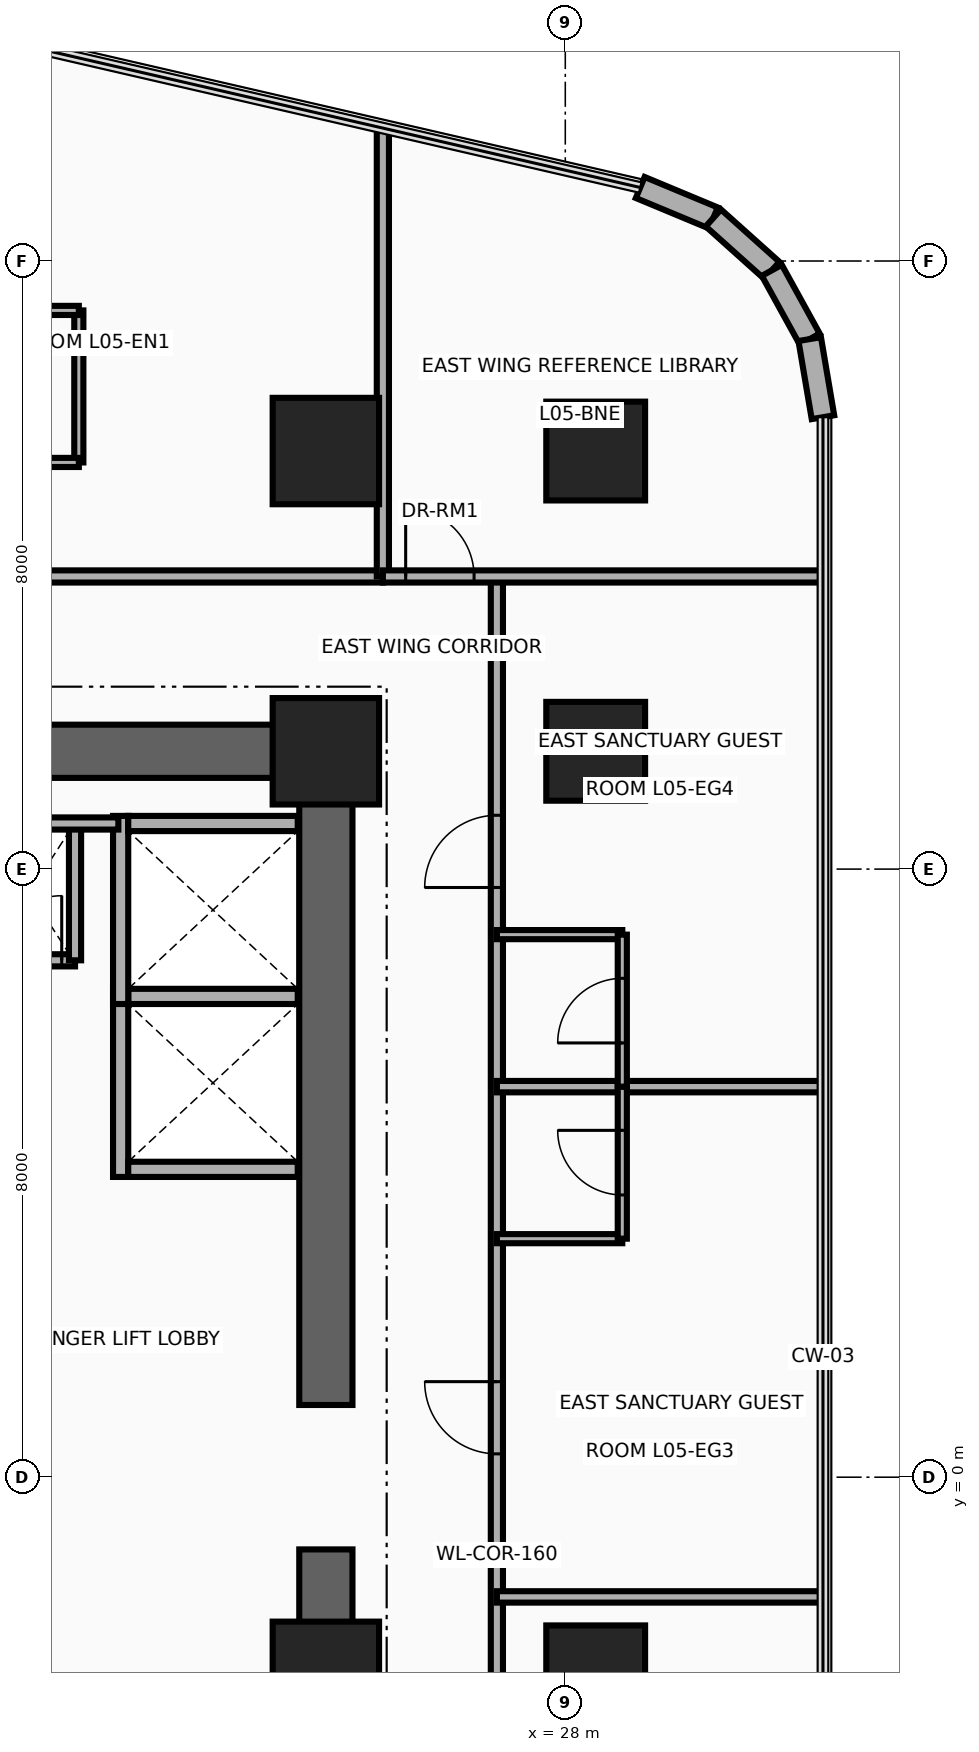
"""IFC4 building model, lengths in metres.
Left out: names, types, materials, properties, quantities, classifications, styles, units other than length and angle.
Written with IfcOpenShell. Run it as: python <this file> out.ifc"""

import sys

from ifc_helpers import new_model, si_unit, direction, frame, frame_2d, origin, origin_2d, place, context, subcontext, project, spatial, rectangle, circle, extrude, source, transform, mapped, element, fill, save


model = new_model("IFC4")
c1 = context("Model", 3, precision=1e-05, world=origin(), true_north=direction((0.0, 1.0)))
c2 = subcontext(c1, "Body", "Model", "MODEL_VIEW")
j1 = project(units=[si_unit("LENGTHUNIT", "METRE"), si_unit("PLANEANGLEUNIT", "RADIAN")], contexts=[c1])
p1 = place(None, origin())
s1 = spatial("IfcSite", under=j1, at=p1, CompositionType="ELEMENT")
p2 = place(p1, origin())
s2 = spatial("IfcBuilding", under=s1, at=p2, CompositionType="ELEMENT")
p3 = place(p2, frame((0.0, 0.0, 26.0)))
s3 = spatial("IfcBuildingStorey", under=s2, at=p3, CompositionType="ELEMENT", Elevation=26.0)
for number, where, z_axis, x_axis in (
    (1, (24.85, -9.9, 0.0), (0.0, 0.0, 1.0), (0.0, 1.0, 0.0)),
    (2, (24.85, 0.95, 0.0), (0.0, 0.0, 1.0), (0.0, 1.0, 0.0)),
):
    element("IfcWall", number, at=place(p3, frame(where, z_axis=z_axis, x_axis=x_axis)), inside=s3, PredefinedType="SHEAR", context=c2, shape_type="SweptSolid", body=[
        extrude(rectangle(XDim=8.95, YDim=0.7, at=frame_2d((4.475, 0.0))), origin(), (0.0, 0.0, 1.0), 3.46),
    ])
p4 = place(p3, frame((15.85, 9.55, 0.0), z_axis=(0.0, 0.0, 1.0), x_axis=(1.0, 0.0, 0.0)))
e3 = element("IfcWall", 3, at=p4, inside=s3, PredefinedType="SHEAR", context=c2, shape_type="SweptSolid", body=[
    extrude(rectangle(XDim=9.0, YDim=0.7, at=frame_2d((4.5, 0.0))), origin(), (0.0, 0.0, 1.0), 3.46),
])
m1 = source(origin(), c2, "Body", "SweptSolid", [
    extrude(rectangle(XDim=1.4, YDim=1.4, at=origin_2d()), origin(), (0.0, 0.0, 1.0), 3.7),
])
p5 = place(p3, frame((24.85, -2.6, 0.0), z_axis=(0.0, 0.0, 1.0), x_axis=(1.0, 0.0, 0.0)))
e4 = element("IfcColumn", 4, at=p5, inside=s3, PredefinedType="COLUMN", context=c2, shape_type="MappedRepresentation", body=[
    mapped(m1, transform((0.0, 0.0, 0.0), x_axis=(1.0, 0.0, 0.0), y_axis=(0.0, 1.0, 0.0), z_axis=(0.0, 0.0, 1.0), scale=1.0)),
])
m2 = source(origin(), c2, "Body", "SweptSolid", [
    extrude(circle(Radius=0.65, at=origin_2d()), origin(), (0.0, 0.0, 1.0), 3.7),
])
p6 = place(p3, frame((28.4, -2.6, 0.0), z_axis=(0.0, 0.0, 1.0), x_axis=(1.0, 0.0, 0.0)))
e5 = element("IfcColumn", 5, at=p6, inside=s3, PredefinedType="COLUMN", context=c2, shape_type="MappedRepresentation", body=[
    mapped(m2, transform((0.0, 0.0, 0.0), x_axis=(1.0, 0.0, 0.0), y_axis=(0.0, 1.0, 0.0), z_axis=(0.0, 0.0, 1.0), scale=1.0)),
])
p7 = place(p3, frame((24.85, 9.55, 0.0), z_axis=(0.0, 0.0, 1.0), x_axis=(1.0, 0.0, 0.0)))
e6 = element("IfcColumn", 6, at=p7, inside=s3, PredefinedType="COLUMN", context=c2, shape_type="MappedRepresentation", body=[
    mapped(m1, transform((0.0, 0.0, 0.0), x_axis=(1.0, 0.0, 0.0), y_axis=(0.0, 1.0, 0.0), z_axis=(0.0, 0.0, 1.0), scale=1.0)),
])
p8 = place(p3, frame((28.4, 9.55, 0.0), z_axis=(0.0, 0.0, 1.0), x_axis=(1.0, 0.0, 0.0)))
e7 = element("IfcColumn", 7, at=p8, inside=s3, PredefinedType="COLUMN", context=c2, shape_type="MappedRepresentation", body=[
    mapped(m2, transform((0.0, 0.0, 0.0), x_axis=(1.0, 0.0, 0.0), y_axis=(0.0, 1.0, 0.0), z_axis=(0.0, 0.0, 1.0), scale=1.0)),
])
p9 = place(p3, frame((24.85, 13.5, 0.0), z_axis=(0.0, 0.0, 1.0), x_axis=(1.0, 0.0, 0.0)))
e8 = element("IfcColumn", 8, at=p9, inside=s3, PredefinedType="COLUMN", context=c2, shape_type="MappedRepresentation", body=[
    mapped(m1, transform((0.0, 0.0, 0.0), x_axis=(1.0, 0.0, 0.0), y_axis=(0.0, 1.0, 0.0), z_axis=(0.0, 0.0, 1.0), scale=1.0)),
])
p10 = place(p3, frame((28.4, 13.5, 0.0), z_axis=(0.0, 0.0, 1.0), x_axis=(1.0, 0.0, 0.0)))
e9 = element("IfcColumn", 9, at=p10, inside=s3, PredefinedType="COLUMN", context=c2, shape_type="MappedRepresentation", body=[
    mapped(m2, transform((0.0, 0.0, 0.0), x_axis=(1.0, 0.0, 0.0), y_axis=(0.0, 1.0, 0.0), z_axis=(0.0, 0.0, 1.0), scale=1.0)),
])
p11 = place(p3, frame((28.986, 16.967, 0.0), z_axis=(0.0, 0.0, 1.0), x_axis=(0.923083852684, -0.384598753136, 0.0)))
e10 = element("IfcWall", 10, at=p11, inside=s3, PredefinedType="SOLIDWALL", context=c2, shape_type="SweptSolid", body=[
    extrude(rectangle(XDim=1.042, YDim=0.3, at=frame_2d((0.521, 0.0))), origin(), (0.0, 0.0, 1.0), 3.46),
])
p12 = place(p3, frame((29.948, 16.566, 0.0), z_axis=(0.0, 0.0, 1.0), x_axis=(0.744585645533, -0.66752694063, 0.0)))
e11 = element("IfcWall", 11, at=p12, inside=s3, PredefinedType="SOLIDWALL", context=c2, shape_type="SweptSolid", body=[
    extrude(rectangle(XDim=1.033, YDim=0.3, at=frame_2d((0.517, 0.0))), origin(), (0.0, 0.0, 1.0), 3.46),
])
p13 = place(p3, frame((30.717, 15.877, 0.0), z_axis=(0.0, 0.0, 1.0), x_axis=(0.482971098131, -0.875636293429, 0.0)))
e12 = element("IfcWall", 12, at=p13, inside=s3, PredefinedType="SOLIDWALL", context=c2, shape_type="SweptSolid", body=[
    extrude(rectangle(XDim=1.033, YDim=0.3, at=frame_2d((0.516, 0.0))), origin(), (0.0, 0.0, 1.0), 3.46),
])
p14 = place(p3, frame((31.216, 14.973, 0.0), z_axis=(0.0, 0.0, 1.0), x_axis=(0.167019462117, -0.985953598946, 0.0)))
e13 = element("IfcWall", 13, at=p14, inside=s3, PredefinedType="SOLIDWALL", context=c2, shape_type="SweptSolid", body=[
    extrude(rectangle(XDim=1.042, YDim=0.3, at=frame_2d((0.521, 0.0))), origin(), (0.0, 0.0, 1.0), 3.46),
])
p15 = place(p3, frame((22.15, 3.95, 0.0), z_axis=(0.0, 0.0, 1.0), x_axis=(0.0, 1.0, 0.0)))
e14 = element("IfcWall", 14, at=p15, inside=s3, PredefinedType="MOVABLE", context=c2, shape_type="SweptSolid", body=[
    extrude(rectangle(XDim=2.475, YDim=0.2, at=frame_2d((1.238, 0.0))), origin(), (0.0, 0.0, 1.0), 3.46),
])
for number, where, z_axis, x_axis in (
    (15, (22.25, 4.05, 0.0), (0.0, 0.0, 1.0), (1.0, 0.0, 0.0)),
    (16, (22.25, 6.325, 0.0), (0.0, 0.0, 1.0), (1.0, 0.0, 0.0)),
):
    element("IfcWall", number, at=place(p3, frame(where, z_axis=z_axis, x_axis=x_axis)), inside=s3, PredefinedType="MOVABLE", context=c2, shape_type="SweptSolid", body=[
        extrude(rectangle(XDim=2.23, YDim=0.2, at=frame_2d((1.115, 0.0))), origin(), (0.0, 0.0, 1.0), 2.245),
    ])
p16 = place(p3, frame((22.15, 6.225, 0.0), z_axis=(0.0, 0.0, 1.0), x_axis=(0.0, 1.0, 0.0)))
e17 = element("IfcWall", 17, at=p16, inside=s3, PredefinedType="MOVABLE", context=c2, shape_type="SweptSolid", body=[
    extrude(rectangle(XDim=2.475, YDim=0.2, at=frame_2d((1.237, 0.0))), origin(), (0.0, 0.0, 1.0), 3.46),
])
p17 = place(p3, frame((22.25, 8.6, 0.0), z_axis=(0.0, 0.0, 1.0), x_axis=(1.0, 0.0, 0.0)))
e18 = element("IfcWall", 18, at=p17, inside=s3, PredefinedType="MOVABLE", context=c2, shape_type="SweptSolid", body=[
    extrude(rectangle(XDim=2.23, YDim=0.2, at=frame_2d((1.115, 0.0))), origin(), (0.0, 0.0, 1.0), 2.245),
])
p18 = place(p3, frame((20.35, 6.8, 0.0), z_axis=(0.0, 0.0, 1.0), x_axis=(1.0, 0.0, 0.0)))
e19 = element("IfcWall", 19, at=p18, inside=s3, PredefinedType="PARTITIONING", context=c2, shape_type="SweptSolid", body=[
    extrude(rectangle(XDim=1.2, YDim=0.16, at=frame_2d((0.6, 0.0))), origin(), (0.0, 0.0, 1.0), 3.46),
])
p19 = place(p18, frame((0.175, 0.0, 0.0)))
e20 = element("IfcOpeningElement", 20, at=p19, cuts=e19, PredefinedType="OPENING", context=c2, shape_type="SweptSolid", body=[
    extrude(rectangle(XDim=0.85, YDim=2.05, at=frame_2d((0.425, 1.025))), frame((0.0, 0.095, 0.0), z_axis=(0.0, -1.0, 0.0), x_axis=(1.0, 0.0, 0.0)), (0.0, 0.0, 1.0), 0.19),
])
p20 = place(p3, frame((21.55, 6.8, 0.0), z_axis=(0.0, 0.0, 1.0), x_axis=(0.0, 1.0, 0.0)))
e21 = element("IfcWall", 21, at=p20, inside=s3, PredefinedType="PARTITIONING", context=c2, shape_type="SweptSolid", body=[
    extrude(rectangle(XDim=1.8, YDim=0.16, at=frame_2d((0.9, 0.0))), origin(), (0.0, 0.0, 1.0), 3.46),
])
p21 = place(p3, frame((20.3, 8.6, 0.0), z_axis=(0.0, 0.0, 1.0), x_axis=(1.0, 0.0, 0.0)))
e22 = element("IfcWall", 22, at=p21, inside=s3, PredefinedType="PARTITIONING", context=c2, shape_type="SweptSolid", body=[
    extrude(rectangle(XDim=1.82, YDim=0.16, at=frame_2d((0.91, 0.0))), origin(), (0.0, 0.0, 1.0), 3.46),
])
p22 = place(p3, frame((15.4, 11.85, 0.0), z_axis=(0.0, 0.0, 1.0), x_axis=(1.0, 0.0, 0.0)))
e23 = element("IfcWall", 23, at=p22, inside=s3, PredefinedType="PARTITIONING", context=c2, shape_type="SweptSolid", body=[
    extrude(rectangle(XDim=10.2, YDim=0.16, at=frame_2d((5.1, 0.0))), origin(), (0.0, 0.0, 1.0), 2.834),
])
p23 = place(p22, frame((4.625, 0.0, 0.0)))
e24 = element("IfcOpeningElement", 24, at=p23, cuts=e23, PredefinedType="OPENING", context=c2, shape_type="SweptSolid", body=[
    extrude(rectangle(XDim=0.95, YDim=2.15, at=frame_2d((0.475, 1.075))), frame((0.0, 0.095, 0.0), z_axis=(0.0, -1.0, 0.0), x_axis=(1.0, 0.0, 0.0)), (0.0, 0.0, 1.0), 0.19),
])
p24 = place(p3, frame((25.6, 11.85, 0.0), z_axis=(0.0, 0.0, 1.0), x_axis=(0.0, 1.0, 0.0)))
e25 = element("IfcWall", 25, at=p24, inside=s3, PredefinedType="PARTITIONING", context=c2, shape_type="SweptSolid", body=[
    extrude(rectangle(XDim=5.898, YDim=0.16, at=frame_2d((2.949, 0.0))), origin(), (0.0, 0.0, 1.0), 2.583),
])
p25 = place(p3, frame((21.6, 13.35, 0.0), z_axis=(0.0, 0.0, 1.0), x_axis=(0.0, 1.0, 0.0)))
e26 = element("IfcWall", 26, at=p25, inside=s3, PredefinedType="PARTITIONING", context=c2, shape_type="SweptSolid", body=[
    extrude(rectangle(XDim=2.0, YDim=0.12, at=frame_2d((1.0, 0.0))), origin(), (0.0, 0.0, 1.0), 2.583),
])
p26 = place(p3, frame((19.4, 15.35, 0.0), z_axis=(0.0, 0.0, 1.0), x_axis=(1.0, 0.0, 0.0)))
e27 = element("IfcWall", 27, at=p26, inside=s3, PredefinedType="PARTITIONING", context=c2, shape_type="SweptSolid", body=[
    extrude(rectangle(XDim=2.2, YDim=0.12, at=frame_2d((1.1, 0.0))), origin(), (0.0, 0.0, 1.0), 3.46),
])
p27 = place(p3, frame((19.4, 13.35, 0.0), z_axis=(0.0, 0.0, 1.0), x_axis=(1.0, 0.0, 0.0)))
e28 = element("IfcWall", 28, at=p27, inside=s3, PredefinedType="PARTITIONING", context=c2, shape_type="SweptSolid", body=[
    extrude(rectangle(XDim=2.2, YDim=0.12, at=frame_2d((1.1, 0.0))), origin(), (0.0, 0.0, 1.0), 2.583),
])
p28 = place(p27, frame((0.675, 0.0, 0.0)))
e29 = element("IfcOpeningElement", 29, at=p28, cuts=e28, PredefinedType="OPENING", context=c2, shape_type="SweptSolid", body=[
    extrude(rectangle(XDim=0.85, YDim=2.1, at=frame_2d((0.425, 1.05))), frame((0.0, 0.075, 0.0), z_axis=(0.0, -1.0, 0.0), x_axis=(1.0, 0.0, 0.0)), (0.0, 0.0, 1.0), 0.15),
])
p29 = place(p3, frame((27.1, -13.89, 0.0), z_axis=(0.0, 0.0, 1.0), x_axis=(0.0, 1.0, 0.0)))
e30 = element("IfcWall", 30, at=p29, inside=s3, PredefinedType="PARTITIONING", context=c2, shape_type="SweptSolid", body=[
    extrude(rectangle(XDim=25.74, YDim=0.16, at=frame_2d((12.87, 0.0))), origin(), (0.0, 0.0, 1.0), 2.583),
])
p30 = place(p29, frame((2.62, 0.0, 0.0)))
e31 = element("IfcOpeningElement", 31, at=p30, cuts=e30, PredefinedType="OPENING", context=c2, shape_type="SweptSolid", body=[
    extrude(rectangle(XDim=0.95, YDim=2.15, at=frame_2d((0.475, 1.075))), frame((0.0, 0.095, 0.0), z_axis=(0.0, -1.0, 0.0), x_axis=(1.0, 0.0, 0.0)), (0.0, 0.0, 1.0), 0.19),
])
p31 = place(p29, frame((8.484, 0.0, 0.0)))
e32 = element("IfcOpeningElement", 32, at=p31, cuts=e30, PredefinedType="OPENING", context=c2, shape_type="SweptSolid", body=[
    extrude(rectangle(XDim=0.95, YDim=2.15, at=frame_2d((0.475, 1.075))), frame((0.0, 0.095, 0.0), z_axis=(0.0, -1.0, 0.0), x_axis=(1.0, 0.0, 0.0)), (0.0, 0.0, 1.0), 0.19),
])
p32 = place(p29, frame((14.197, 0.0, 0.0)))
e33 = element("IfcOpeningElement", 33, at=p32, cuts=e30, PredefinedType="OPENING", context=c2, shape_type="SweptSolid", body=[
    extrude(rectangle(XDim=0.95, YDim=2.15, at=frame_2d((0.475, 1.075))), frame((0.0, 0.095, 0.0), z_axis=(0.0, -1.0, 0.0), x_axis=(1.0, 0.0, 0.0)), (0.0, 0.0, 1.0), 0.19),
])
p33 = place(p29, frame((21.648, 0.0, 0.0)))
e34 = element("IfcOpeningElement", 34, at=p33, cuts=e30, PredefinedType="OPENING", context=c2, shape_type="SweptSolid", body=[
    extrude(rectangle(XDim=0.95, YDim=2.15, at=frame_2d((0.475, 1.075))), frame((0.0, 0.095, 0.0), z_axis=(0.0, -1.0, 0.0), x_axis=(1.0, 0.0, 0.0)), (0.0, 0.0, 1.0), 0.19),
])
p34 = place(p3, frame((25.6, 11.85, 0.0), z_axis=(0.0, 0.0, 1.0), x_axis=(1.0, 0.0, 0.0)))
e35 = element("IfcWall", 35, at=p34, inside=s3, PredefinedType="PARTITIONING", context=c2, shape_type="SweptSolid", body=[
    extrude(rectangle(XDim=5.79, YDim=0.16, at=frame_2d((2.895, 0.0))), origin(), (0.0, 0.0, 1.0), 2.896),
])
p35 = place(p34, frame((0.3, 0.0, 0.0)))
e36 = element("IfcOpeningElement", 36, at=p35, cuts=e35, PredefinedType="OPENING", context=c2, shape_type="SweptSolid", body=[
    extrude(rectangle(XDim=0.9, YDim=2.1, at=frame_2d((0.45, 1.05))), frame((0.0, 0.095, 0.0), z_axis=(0.0, -1.0, 0.0), x_axis=(1.0, 0.0, 0.0)), (0.0, 0.0, 1.0), 0.19),
])
for number, where, z_axis, x_axis in (
    (37, (27.1, -1.575, 0.0), (0.0, 0.0, 1.0), (1.0, 0.0, 0.0)),
    (38, (27.1, 5.138, 0.0), (0.0, 0.0, 1.0), (1.0, 0.0, 0.0)),
):
    element("IfcWall", number, at=place(p3, frame(where, z_axis=z_axis, x_axis=x_axis)), inside=s3, PredefinedType="PARTITIONING", context=c2, shape_type="SweptSolid", body=[
        extrude(rectangle(XDim=4.29, YDim=0.15, at=frame_2d((2.145, 0.0))), origin(), (0.0, 0.0, 1.0), 2.896),
    ])
p36 = place(p3, frame((27.1, 3.138, 0.0), z_axis=(0.0, 0.0, 1.0), x_axis=(1.0, 0.0, 0.0)))
e39 = element("IfcWall", 39, at=p36, inside=s3, PredefinedType="PARTITIONING", context=c2, shape_type="SweptSolid", body=[
    extrude(rectangle(XDim=1.65, YDim=0.12, at=frame_2d((0.825, 0.0))), origin(), (0.0, 0.0, 1.0), 2.896),
])
p37 = place(p3, frame((28.75, 3.138, 0.0), z_axis=(0.0, 0.0, 1.0), x_axis=(0.0, 1.0, 0.0)))
e40 = element("IfcWall", 40, at=p37, inside=s3, PredefinedType="PARTITIONING", context=c2, shape_type="SweptSolid", body=[
    extrude(rectangle(XDim=2.0, YDim=0.12, at=frame_2d((1.0, 0.0))), origin(), (0.0, 0.0, 1.0), 3.46),
])
p38 = place(p37, frame((0.575, 0.0, 0.0)))
e41 = element("IfcOpeningElement", 41, at=p38, cuts=e40, PredefinedType="OPENING", context=c2, shape_type="SweptSolid", body=[
    extrude(rectangle(XDim=0.85, YDim=2.1, at=frame_2d((0.425, 1.05))), frame((0.0, 0.075, 0.0), z_axis=(0.0, -1.0, 0.0), x_axis=(1.0, 0.0, 0.0)), (0.0, 0.0, 1.0), 0.15),
])
p39 = place(p3, frame((27.1, 7.138, 0.0), z_axis=(0.0, 0.0, 1.0), x_axis=(1.0, 0.0, 0.0)))
e42 = element("IfcWall", 42, at=p39, inside=s3, PredefinedType="PARTITIONING", context=c2, shape_type="SweptSolid", body=[
    extrude(rectangle(XDim=1.65, YDim=0.12, at=frame_2d((0.825, 0.0))), origin(), (0.0, 0.0, 1.0), 2.896),
])
p40 = place(p3, frame((28.75, 5.138, 0.0), z_axis=(0.0, 0.0, 1.0), x_axis=(0.0, 1.0, 0.0)))
e43 = element("IfcWall", 43, at=p40, inside=s3, PredefinedType="PARTITIONING", context=c2, shape_type="SweptSolid", body=[
    extrude(rectangle(XDim=2.0, YDim=0.12, at=frame_2d((1.0, 0.0))), origin(), (0.0, 0.0, 1.0), 3.46),
])
p41 = place(p40, frame((0.575, 0.0, 0.0)))
e44 = element("IfcOpeningElement", 44, at=p41, cuts=e43, PredefinedType="OPENING", context=c2, shape_type="SweptSolid", body=[
    extrude(rectangle(XDim=0.85, YDim=2.1, at=frame_2d((0.425, 1.05))), frame((0.0, 0.075, 0.0), z_axis=(0.0, -1.0, 0.0), x_axis=(1.0, 0.0, 0.0)), (0.0, 0.0, 1.0), 0.15),
])
p42 = place(p19, origin())
e45 = element("IfcDoor", 45, at=p42, inside=s3, OperationType="SINGLE_SWING_LEFT", PredefinedType="DOOR", context=c2, shape_type="SweptSolid", body=[
    extrude(rectangle(XDim=0.85, YDim=2.05, at=frame_2d((0.425, 1.025))), frame((0.0, 0.025, 0.0), z_axis=(0.0, -1.0, 0.0), x_axis=(1.0, 0.0, 0.0)), (0.0, 0.0, 1.0), 0.05),
])
fill(e20, e45)
p43 = place(p35, origin())
e46 = element("IfcDoor", 46, at=p43, inside=s3, OperationType="SINGLE_SWING_LEFT", PredefinedType="DOOR", context=c2, shape_type="SweptSolid", body=[
    extrude(rectangle(XDim=0.9, YDim=2.1, at=frame_2d((0.45, 1.05))), frame((0.0, 0.025, 0.0), z_axis=(0.0, -1.0, 0.0), x_axis=(1.0, 0.0, 0.0)), (0.0, 0.0, 1.0), 0.05),
])
fill(e36, e46)
p44 = place(p32, origin())
e47 = element("IfcDoor", 47, at=p44, inside=s3, OperationType="SINGLE_SWING_RIGHT", PredefinedType="DOOR", context=c2, shape_type="SweptSolid", body=[
    extrude(rectangle(XDim=0.95, YDim=2.15, at=frame_2d((0.475, 1.075))), frame((0.0, 0.025, 0.0), z_axis=(0.0, -1.0, 0.0), x_axis=(1.0, 0.0, 0.0)), (0.0, 0.0, 1.0), 0.05),
])
fill(e33, e47)
p45 = place(p38, origin())
e48 = element("IfcDoor", 48, at=p45, inside=s3, OperationType="SINGLE_SWING_LEFT", PredefinedType="DOOR", context=c2, shape_type="SweptSolid", body=[
    extrude(rectangle(XDim=0.85, YDim=2.1, at=frame_2d((0.425, 1.05))), frame((0.0, 0.025, 0.0), z_axis=(0.0, -1.0, 0.0), x_axis=(1.0, 0.0, 0.0)), (0.0, 0.0, 1.0), 0.05),
])
fill(e41, e48)
p46 = place(p33, origin())
e49 = element("IfcDoor", 49, at=p46, inside=s3, OperationType="SINGLE_SWING_RIGHT", PredefinedType="DOOR", context=c2, shape_type="SweptSolid", body=[
    extrude(rectangle(XDim=0.95, YDim=2.15, at=frame_2d((0.475, 1.075))), frame((0.0, 0.025, 0.0), z_axis=(0.0, -1.0, 0.0), x_axis=(1.0, 0.0, 0.0)), (0.0, 0.0, 1.0), 0.05),
])
fill(e34, e49)
p47 = place(p41, origin())
e50 = element("IfcDoor", 50, at=p47, inside=s3, OperationType="SINGLE_SWING_LEFT", PredefinedType="DOOR", context=c2, shape_type="SweptSolid", body=[
    extrude(rectangle(XDim=0.85, YDim=2.1, at=frame_2d((0.425, 1.05))), frame((0.0, 0.025, 0.0), z_axis=(0.0, -1.0, 0.0), x_axis=(1.0, 0.0, 0.0)), (0.0, 0.0, 1.0), 0.05),
])
fill(e44, e50)
save(model, sys.argv[1])
